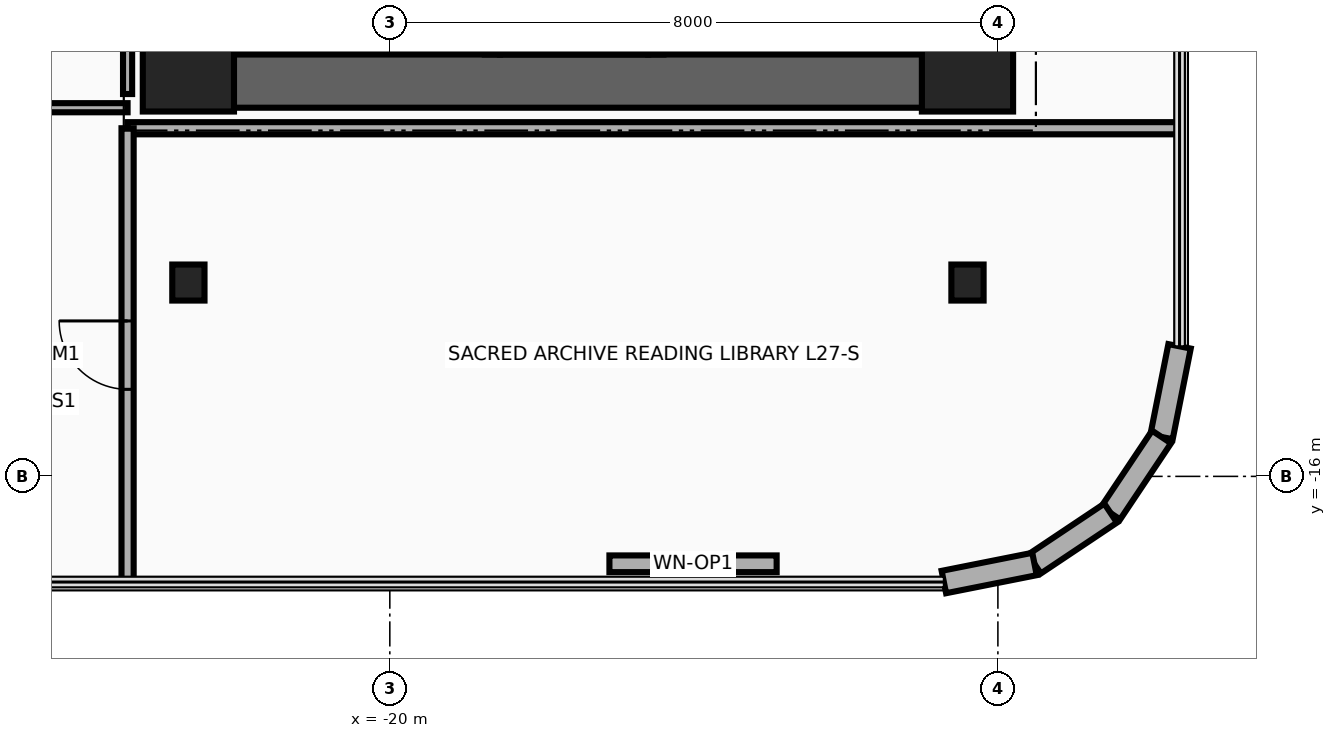
"""IFC4 building model, lengths in metres.
Left out: names, types, materials, properties, quantities, classifications, styles, units other than length and angle.
Written with IfcOpenShell. Run it as: python <this file> out.ifc"""

import sys

from ifc_helpers import new_model, si_unit, direction, frame, frame_2d, origin, origin_2d, place, context, subcontext, project, spatial, rectangle, i_section, extrude, source, transform, mapped, element, fill, save


model = new_model("IFC4")
c1 = context("Model", 3, precision=1e-05, world=origin(), true_north=direction((0.0, 1.0)))
c2 = subcontext(c1, "Body", "Model", "MODEL_VIEW")
j1 = project(units=[si_unit("LENGTHUNIT", "METRE"), si_unit("PLANEANGLEUNIT", "RADIAN")], contexts=[c1])
p1 = place(None, origin())
s1 = spatial("IfcSite", under=j1, at=p1, CompositionType="ELEMENT")
p2 = place(p1, origin())
s2 = spatial("IfcBuilding", under=s1, at=p2, CompositionType="ELEMENT")
p3 = place(p2, frame((0.0, 0.0, 109.4)))
s3 = spatial("IfcBuildingStorey", under=s2, at=p3, CompositionType="ELEMENT", Elevation=109.4)
for number, where, z_axis, x_axis in (
    (1, (-22.16, -10.45, 0.0), (0.0, 0.0, 1.0), (0.0, 1.0, 0.0)),
    (2, (-18.83, -10.45, 0.0), (0.0, 0.0, 1.0), (0.0, 1.0, 0.0)),
):
    element("IfcWall", number, at=place(p3, frame(where, z_axis=z_axis, x_axis=x_axis)), inside=s3, PredefinedType="SHEAR", context=c2, shape_type="SweptSolid", body=[
        extrude(rectangle(XDim=8.67, YDim=0.22, at=frame_2d((4.335, 0.0))), origin(), (0.0, 0.0, 1.0), 3.46),
    ])
p4 = place(p3, frame((-22.65, -11.15, 0.0), z_axis=(0.0, 0.0, 1.0), x_axis=(0.0, 1.0, 0.0)))
e3 = element("IfcWall", 3, at=p4, inside=s3, PredefinedType="SHEAR", context=c2, shape_type="SweptSolid", body=[
    extrude(rectangle(XDim=22.3, YDim=0.7, at=frame_2d((11.15, 0.0))), origin(), (0.0, 0.0, 1.0), 3.46),
])
p5 = place(p3, frame((-22.65, -10.8, 0.0), z_axis=(0.0, 0.0, 1.0), x_axis=(1.0, 0.0, 0.0)))
e4 = element("IfcWall", 4, at=p5, inside=s3, PredefinedType="SHEAR", context=c2, shape_type="SweptSolid", body=[
    extrude(rectangle(XDim=10.25, YDim=0.7, at=frame_2d((5.125, 0.0))), origin(), (0.0, 0.0, 1.0), 3.46),
])
m1 = source(origin(), c2, "Body", "SweptSolid", [
    extrude(rectangle(XDim=1.2, YDim=1.2, at=origin_2d()), origin(), (0.0, 0.0, 1.0), 3.7),
])
for number, where, z_axis, x_axis in (
    (5, (-22.65, -10.6, 0.0), (0.0, 0.0, 1.0), (1.0, 0.0, 0.0)),
    (6, (-12.4, -10.6, 0.0), (0.0, 0.0, 1.0), (1.0, 0.0, 0.0)),
):
    element("IfcColumn", number, at=place(p3, frame(where, z_axis=z_axis, x_axis=x_axis)), inside=s3, PredefinedType="COLUMN", context=c2, shape_type="MappedRepresentation", body=[
        mapped(m1, transform((0.0, 0.0, 0.0), x_axis=(1.0, 0.0, 0.0), y_axis=(0.0, 1.0, 0.0), z_axis=(0.0, 0.0, 1.0), scale=1.0)),
    ])
m2 = source(origin(), c2, "Body", "SweptSolid", [
    extrude(i_section(OverallWidth=0.424, OverallDepth=0.474, WebThickness=0.048, FlangeThickness=0.077, at=origin_2d()), origin(), (0.0, 0.0, 1.0), 3.7),
])
for number, where, z_axis, x_axis in (
    (7, (-22.65, -13.45, 0.0), (0.0, 0.0, 1.0), (1.0, 0.0, 0.0)),
    (8, (-12.4, -13.45, 0.0), (0.0, 0.0, 1.0), (1.0, 0.0, 0.0)),
):
    element("IfcColumn", number, at=place(p3, frame(where, z_axis=z_axis, x_axis=x_axis)), inside=s3, PredefinedType="COLUMN", context=c2, shape_type="MappedRepresentation", body=[
        mapped(m2, transform((0.0, 0.0, 0.0), x_axis=(1.0, 0.0, 0.0), y_axis=(0.0, 1.0, 0.0), z_axis=(0.0, 0.0, 1.0), scale=1.0)),
    ])
p6 = place(p3, frame((-9.61, -14.289, 0.0), z_axis=(0.0, 0.0, 1.0), x_axis=(-0.194996050505, -0.980804027463, 0.0)))
e9 = element("IfcWall", 9, at=p6, inside=s3, PredefinedType="SOLIDWALL", context=c2, shape_type="SweptSolid", body=[
    extrude(rectangle(XDim=1.216, YDim=0.3, at=frame_2d((0.608, 0.0))), origin(), (0.0, 0.0, 1.0), 3.46),
])
for number, where, z_axis, x_axis in (
    (10, (-9.847, -15.482, 0.0), (0.0, 0.0, 1.0), (-0.556, -0.831, 0.0)),
    (11, (-10.517, -16.483, 0.0), (0.0, 0.0, 1.0), (-0.831, -0.556, 0.0)),
):
    element("IfcWall", number, at=place(p3, frame(where, z_axis=z_axis, x_axis=x_axis)), inside=s3, PredefinedType="SOLIDWALL", context=c2, shape_type="SweptSolid", body=[
        extrude(rectangle(XDim=1.205, YDim=0.3, at=frame_2d((0.603, 0.0))), origin(), (0.0, 0.0, 1.0), 3.46),
    ])
p7 = place(p3, frame((-11.518, -17.153, 0.0), z_axis=(0.0, 0.0, 1.0), x_axis=(-0.980804027463, -0.194996050505, 0.0)))
e12 = element("IfcWall", 12, at=p7, inside=s3, PredefinedType="SOLIDWALL", context=c2, shape_type="SweptSolid", body=[
    extrude(rectangle(XDim=1.216, YDim=0.3, at=frame_2d((0.608, 0.0))), origin(), (0.0, 0.0, 1.0), 3.46),
])
p8 = place(p3, frame((-14.911, -17.15, 0.0), z_axis=(0.0, 0.0, 1.0), x_axis=(-1.0, 0.0, 0.0)))
e13 = element("IfcWall", 13, at=p8, inside=s3, PredefinedType="SOLIDWALL", context=c2, shape_type="SweptSolid", body=[
    extrude(rectangle(XDim=2.2, YDim=0.22, at=frame_2d((1.1, 0.0))), origin(), (0.0, 0.0, 1.0), 3.46),
])
p9 = place(p8, frame((0.65, 0.0, 0.95)))
e14 = element("IfcOpeningElement", 14, at=p9, cuts=e13, PredefinedType="OPENING", context=c2, shape_type="SweptSolid", body=[
    extrude(rectangle(XDim=0.9, YDim=1.3, at=frame_2d((0.45, 0.65))), frame((0.0, 0.125, 0.0), z_axis=(0.0, -1.0, 0.0), x_axis=(1.0, 0.0, 0.0)), (0.0, 0.0, 1.0), 0.25),
])
for number, where, z_axis, x_axis in (
    (15, (-18.65, -10.45, 0.0), (0.0, 0.0, 1.0), (0.0, 1.0, 0.0)),
    (16, (-16.5, -10.45, 0.0), (0.0, 0.0, 1.0), (0.0, 1.0, 0.0)),
):
    element("IfcWall", number, at=place(p3, frame(where, z_axis=z_axis, x_axis=x_axis)), inside=s3, PredefinedType="MOVABLE", context=c2, shape_type="SweptSolid", body=[
        extrude(rectangle(XDim=2.35, YDim=0.2, at=frame_2d((1.175, 0.0))), origin(), (0.0, 0.0, 1.0), 2.666),
    ])
p10 = place(p3, frame((-18.55, -10.35, 0.0), z_axis=(0.0, 0.0, 1.0), x_axis=(1.0, 0.0, 0.0)))
e17 = element("IfcWall", 17, at=p10, inside=s3, PredefinedType="MOVABLE", context=c2, shape_type="SweptSolid", body=[
    extrude(rectangle(XDim=1.95, YDim=0.2, at=frame_2d((0.975, 0.0))), origin(), (0.0, 0.0, 1.0), 2.666),
])
p11 = place(p3, frame((-23.45, -11.42, 0.0), z_axis=(0.0, 0.0, 1.0), x_axis=(1.0, 0.0, 0.0)))
e18 = element("IfcWall", 18, at=p11, inside=s3, PredefinedType="PARTITIONING", context=c2, shape_type="SweptSolid", body=[
    extrude(rectangle(XDim=13.84, YDim=0.16, at=frame_2d((6.92, 0.0))), origin(), (0.0, 0.0, 1.0), 2.834),
])
p12 = place(p3, frame((-23.45, -17.39, 0.0), z_axis=(0.0, 0.0, 1.0), x_axis=(0.0, 1.0, 0.0)))
e19 = element("IfcWall", 19, at=p12, inside=s3, PredefinedType="PARTITIONING", context=c2, shape_type="SweptSolid", body=[
    extrude(rectangle(XDim=5.97, YDim=0.16, at=frame_2d((2.985, 0.0))), origin(), (0.0, 0.0, 1.0), 3.46),
])
p13 = place(p12, frame((2.535, 0.0, 0.0)))
e20 = element("IfcOpeningElement", 20, at=p13, cuts=e19, PredefinedType="OPENING", context=c2, shape_type="SweptSolid", body=[
    extrude(rectangle(XDim=0.9, YDim=2.1, at=frame_2d((0.45, 1.05))), frame((0.0, 0.095, 0.0), z_axis=(0.0, -1.0, 0.0), x_axis=(1.0, 0.0, 0.0)), (0.0, 0.0, 1.0), 0.19),
])
p14 = place(p3, frame((-27.468, -11.15, 0.0), z_axis=(0.0, 0.0, 1.0), x_axis=(1.0, 0.0, 0.0)))
e21 = element("IfcWall", 21, at=p14, inside=s3, PredefinedType="PARTITIONING", context=c2, shape_type="SweptSolid", body=[
    extrude(rectangle(XDim=4.018, YDim=0.12, at=frame_2d((2.009, 0.0))), origin(), (0.0, 0.0, 1.0), 3.46),
])
p15 = place(p3, frame((-23.45, -10.97, 0.0), z_axis=(0.0, 0.0, 1.0), x_axis=(0.0, 1.0, 0.0)))
e22 = element("IfcWall", 22, at=p15, inside=s3, PredefinedType="PARTITIONING", context=c2, shape_type="SweptSolid", body=[
    extrude(rectangle(XDim=1.59, YDim=0.12, at=frame_2d((0.795, 0.0))), origin(), (0.0, 0.0, 1.0), 2.666),
])
p16 = place(p9, origin())
e23 = element("IfcWindow", 23, at=p16, inside=s3, PartitioningType="SINGLE_PANEL", PredefinedType="WINDOW", context=c2, shape_type="SweptSolid", body=[
    extrude(rectangle(XDim=0.9, YDim=1.3, at=frame_2d((0.45, 0.65))), frame((0.0, 0.03, 0.0), z_axis=(0.0, -1.0, 0.0), x_axis=(1.0, 0.0, 0.0)), (0.0, 0.0, 1.0), 0.06),
])
fill(e14, e23)
p17 = place(p13, origin())
e24 = element("IfcDoor", 24, at=p17, inside=s3, OperationType="SINGLE_SWING_RIGHT", PredefinedType="DOOR", context=c2, shape_type="SweptSolid", body=[
    extrude(rectangle(XDim=0.9, YDim=2.1, at=frame_2d((0.45, 1.05))), frame((0.0, 0.025, 0.0), z_axis=(0.0, -1.0, 0.0), x_axis=(1.0, 0.0, 0.0)), (0.0, 0.0, 1.0), 0.05),
])
fill(e20, e24)
save(model, sys.argv[1])
